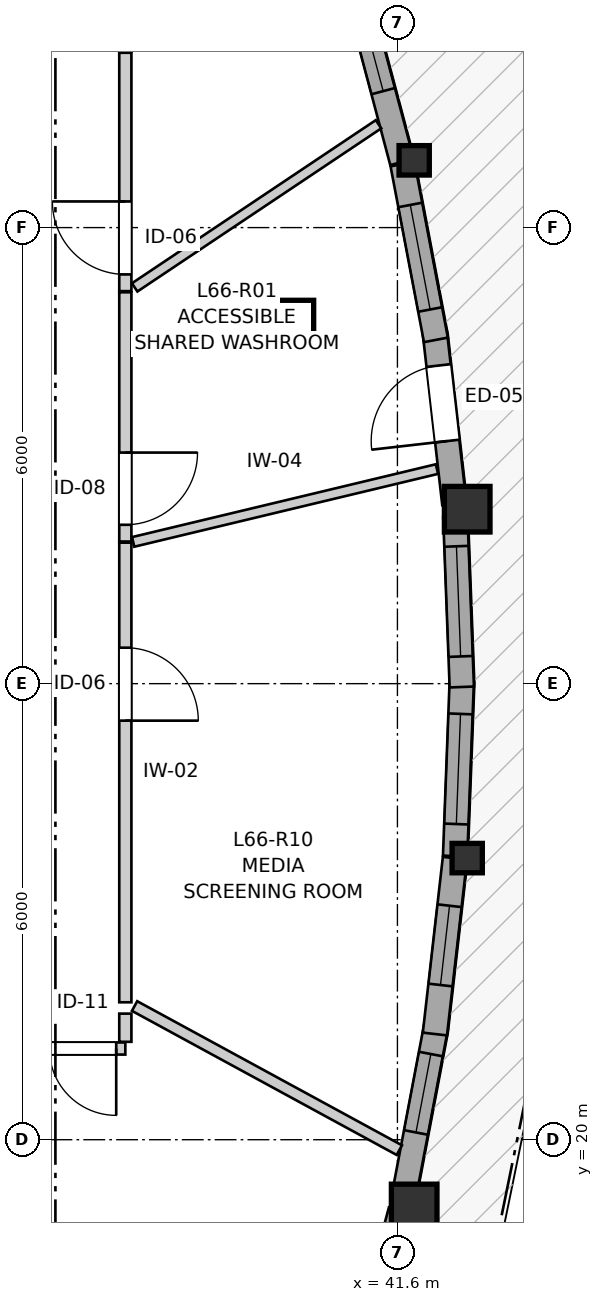
"""IFC4 building model, lengths in metres.
Left out: names, types, materials, properties, quantities, classifications, styles, units other than length and angle.
Written with IfcOpenShell. Run it as: python <this file> out.ifc"""

import sys

from ifc_helpers import new_model, si_unit, direction, frame, frame_2d, origin, origin_2d, place, context, subcontext, project, spatial, rectangle, i_section, extrude, source, transform, mapped, element, fill, save


model = new_model("IFC4")
c1 = context("Model", 3, precision=1e-05, world=origin(), true_north=direction((0.0, 1.0)))
c2 = subcontext(c1, "Body", "Model", "MODEL_VIEW")
j1 = project(units=[si_unit("LENGTHUNIT", "METRE"), si_unit("PLANEANGLEUNIT", "RADIAN")], contexts=[c1])
p1 = place(None, origin())
s1 = spatial("IfcSite", under=j1, at=p1, CompositionType="ELEMENT")
p2 = place(p1, origin())
s2 = spatial("IfcBuilding", under=s1, at=p2, CompositionType="ELEMENT")
p3 = place(p2, frame((0.0, 0.0, 221.2)))
s3 = spatial("IfcBuildingStorey", under=s2, at=p3, CompositionType="ELEMENT", Elevation=221.2)
m1 = source(origin(), c2, "Body", "SweptSolid", [
    extrude(rectangle(XDim=0.6, YDim=0.6, at=origin_2d()), origin(), (0.0, 0.0, 1.0), 2.96),
])
p4 = place(p3, frame((41.82, 19.115, 0.0), z_axis=(0.0, 0.0, 1.0), x_axis=(1.0, 0.0, 0.0)))
e1 = element("IfcColumn", 1, at=p4, inside=s3, PredefinedType="COLUMN", context=c2, shape_type="MappedRepresentation", body=[
    mapped(m1, transform((0.0, 0.0, 0.0), x_axis=(1.0, 0.0, 0.0), y_axis=(0.0, 1.0, 0.0), z_axis=(0.0, 0.0, 1.0), scale=1.0)),
])
m2 = source(origin(), c2, "Body", "SweptSolid", [
    extrude(i_section(OverallWidth=0.398, OverallDepth=0.387, WebThickness=0.019, FlangeThickness=0.03, FilletRadius=0.015, at=origin_2d()), origin(), (0.0, 0.0, 1.0), 2.96),
])
p5 = place(p3, frame((42.518, 23.705, 0.0), z_axis=(0.0, 0.0, 1.0), x_axis=(1.0, 0.0, 0.0)))
e2 = element("IfcColumn", 2, at=p5, inside=s3, PredefinedType="PILASTER", context=c2, shape_type="MappedRepresentation", body=[
    mapped(m2, transform((0.0, 0.0, 0.0), x_axis=(1.0, 0.0, 0.0), y_axis=(0.0, 1.0, 0.0), z_axis=(0.0, 0.0, 1.0), scale=1.0)),
])
p6 = place(p3, frame((42.518, 28.295, 0.0), z_axis=(0.0, 0.0, 1.0), x_axis=(1.0, 0.0, 0.0)))
e3 = element("IfcColumn", 3, at=p6, inside=s3, PredefinedType="COLUMN", context=c2, shape_type="MappedRepresentation", body=[
    mapped(m1, transform((0.0, 0.0, 0.0), x_axis=(1.0, 0.0, 0.0), y_axis=(0.0, 1.0, 0.0), z_axis=(0.0, 0.0, 1.0), scale=1.0)),
])
p7 = place(p3, frame((41.82, 32.885, 0.0), z_axis=(0.0, 0.0, 1.0), x_axis=(1.0, 0.0, 0.0)))
e4 = element("IfcColumn", 4, at=p7, inside=s3, PredefinedType="PILASTER", context=c2, shape_type="MappedRepresentation", body=[
    mapped(m2, transform((0.0, 0.0, 0.0), x_axis=(1.0, 0.0, 0.0), y_axis=(0.0, 1.0, 0.0), z_axis=(0.0, 0.0, 1.0), scale=1.0)),
])
p8 = place(p3, frame((41.045, 16.824, 0.0), z_axis=(0.0, 0.0, 1.0), x_axis=(0.257099982868, 0.966384808867, 0.0)))
e5 = element("IfcWall", 5, at=p8, inside=s3, PredefinedType="SOLIDWALL", context=c2, shape_type="SweptSolid", body=[
    extrude(rectangle(XDim=2.323, YDim=0.32, at=frame_2d((1.161, 0.0))), origin(), (0.0, 0.0, 1.0), 2.58),
])
p9 = place(p8, frame((0.491, 0.0, 0.82)))
e6 = element("IfcOpeningElement", 6, at=p9, cuts=e5, PredefinedType="OPENING", context=c2, shape_type="SweptSolid", body=[
    extrude(rectangle(XDim=1.35, YDim=1.45, at=frame_2d((0.675, 0.725))), frame((0.0, 0.17, 0.0), z_axis=(0.0, -1.0, 0.0), x_axis=(1.0, 0.0, 0.0)), (0.0, 0.0, 1.0), 0.34),
])
p10 = place(p3, frame((41.68, 19.233, 0.0), z_axis=(0.0, 0.0, 1.0), x_axis=(0.186630727552, 0.982430135701, 0.0)))
e7 = element("IfcWall", 7, at=p10, inside=s3, PredefinedType="SOLIDWALL", context=c2, shape_type="SweptSolid", body=[
    extrude(rectangle(XDim=2.284, YDim=0.32, at=frame_2d((1.142, 0.0))), origin(), (0.0, 0.0, 1.0), 2.58),
])
p11 = place(p10, frame((0.878, 0.0, 0.82)))
e8 = element("IfcOpeningElement", 8, at=p11, cuts=e7, PredefinedType="OPENING", context=c2, shape_type="SweptSolid", body=[
    extrude(rectangle(XDim=1.05, YDim=1.45, at=frame_2d((0.525, 0.725))), frame((0.0, 0.17, 0.0), z_axis=(0.0, -1.0, 0.0), x_axis=(1.0, 0.0, 0.0)), (0.0, 0.0, 1.0), 0.34),
])
p12 = place(p3, frame((42.093, 21.39, 0.0), z_axis=(0.0, 0.0, 1.0), x_axis=(0.113262644001, 0.993565082656, 0.0)))
e9 = element("IfcWall", 9, at=p12, inside=s3, PredefinedType="SOLIDWALL", context=c2, shape_type="SweptSolid", body=[
    extrude(rectangle(XDim=2.328, YDim=0.32, at=frame_2d((1.164, 0.0))), origin(), (0.0, 0.0, 1.0), 2.58),
])
p13 = place(p12, frame((0.649, 0.0, 0.82)))
e10 = element("IfcOpeningElement", 10, at=p13, cuts=e9, PredefinedType="OPENING", context=c2, shape_type="SweptSolid", body=[
    extrude(rectangle(XDim=1.05, YDim=1.45, at=frame_2d((0.525, 0.725))), frame((0.0, 0.17, 0.0), z_axis=(0.0, -1.0, 0.0), x_axis=(1.0, 0.0, 0.0)), (0.0, 0.0, 1.0), 0.34),
])
p14 = place(p3, frame((42.359, 23.731, 0.0), z_axis=(0.0, 0.0, 1.0), x_axis=(0.037975332386, 0.999278676912, 0.0)))
e11 = element("IfcWall", 11, at=p14, inside=s3, PredefinedType="SOLIDWALL", context=c2, shape_type="SweptSolid", body=[
    extrude(rectangle(XDim=2.314, YDim=0.32, at=frame_2d((1.157, 0.0))), origin(), (0.0, 0.0, 1.0), 2.58),
])
p15 = place(p14, frame((0.422, 0.0, 0.82)))
e12 = element("IfcOpeningElement", 12, at=p15, cuts=e11, PredefinedType="OPENING", context=c2, shape_type="SweptSolid", body=[
    extrude(rectangle(XDim=1.45, YDim=1.25, at=frame_2d((0.725, 0.625))), frame((0.0, 0.17, 0.0), z_axis=(0.0, -1.0, 0.0), x_axis=(1.0, 0.0, 0.0)), (0.0, 0.0, 1.0), 0.34),
])
p16 = place(p3, frame((42.447, 25.956, 0.0), z_axis=(0.0, 0.0, 1.0), x_axis=(-0.037961080573, 0.999279218418, 0.0)))
e13 = element("IfcWall", 13, at=p16, inside=s3, PredefinedType="SOLIDWALL", context=c2, shape_type="SweptSolid", body=[
    extrude(rectangle(XDim=2.245, YDim=0.32, at=frame_2d((1.122, 0.0))), origin(), (0.0, 0.0, 1.0), 2.58),
])
p17 = place(p16, frame((0.402, 0.0, 0.82)))
e14 = element("IfcOpeningElement", 14, at=p17, cuts=e13, PredefinedType="OPENING", context=c2, shape_type="SweptSolid", body=[
    extrude(rectangle(XDim=1.45, YDim=1.25, at=frame_2d((0.725, 0.625))), frame((0.0, 0.17, 0.0), z_axis=(0.0, -1.0, 0.0), x_axis=(1.0, 0.0, 0.0)), (0.0, 0.0, 1.0), 0.34),
])
p18 = place(p3, frame((42.349, 28.366, 0.0), z_axis=(0.0, 0.0, 1.0), x_axis=(-0.113314829757, 0.99355913229, 0.0)))
e15 = element("IfcWall", 15, at=p18, inside=s3, PredefinedType="SOLIDWALL", context=c2, shape_type="SweptSolid", body=[
    extrude(rectangle(XDim=2.258, YDim=0.32, at=frame_2d((1.129, 0.0))), origin(), (0.0, 0.0, 1.0), 2.58),
])
p19 = place(p18, frame((0.83, 0.0, 0.0)))
e16 = element("IfcOpeningElement", 16, at=p19, cuts=e15, PredefinedType="OPENING", context=c2, shape_type="SweptSolid", body=[
    extrude(rectangle(XDim=1.0, YDim=2.1, at=frame_2d((0.5, 1.05))), frame((0.0, 0.17, 0.0), z_axis=(0.0, -1.0, 0.0), x_axis=(1.0, 0.0, 0.0)), (0.0, 0.0, 1.0), 0.34),
])
p20 = place(p3, frame((42.106, 30.523, 0.0), z_axis=(0.0, 0.0, 1.0), x_axis=(-0.186673658051, 0.982421979289, 0.0)))
e17 = element("IfcWall", 17, at=p20, inside=s3, PredefinedType="SOLIDWALL", context=c2, shape_type="SweptSolid", body=[
    extrude(rectangle(XDim=2.354, YDim=0.32, at=frame_2d((1.177, 0.0))), origin(), (0.0, 0.0, 1.0), 2.58),
])
p21 = place(p20, frame((0.407, 0.0, 0.82)))
e18 = element("IfcOpeningElement", 18, at=p21, cuts=e17, PredefinedType="OPENING", context=c2, shape_type="SweptSolid", body=[
    extrude(rectangle(XDim=1.4, YDim=1.35, at=frame_2d((0.7, 0.675))), frame((0.0, 0.17, 0.0), z_axis=(0.0, -1.0, 0.0), x_axis=(1.0, 0.0, 0.0)), (0.0, 0.0, 1.0), 0.34),
])
p22 = place(p3, frame((41.66, 32.863, 0.0), z_axis=(0.0, 0.0, 1.0), x_axis=(-0.257008511659, 0.966409139513, 0.0)))
e19 = element("IfcWall", 19, at=p22, inside=s3, PredefinedType="SOLIDWALL", context=c2, shape_type="SweptSolid", body=[
    extrude(rectangle(XDim=2.393, YDim=0.32, at=frame_2d((1.196, 0.0))), origin(), (0.0, 0.0, 1.0), 2.58),
])
p23 = place(p22, frame((0.965, 0.0, 0.82)))
e20 = element("IfcOpeningElement", 20, at=p23, cuts=e19, PredefinedType="OPENING", context=c2, shape_type="SweptSolid", body=[
    extrude(rectangle(XDim=0.95, YDim=1.35, at=frame_2d((0.475, 0.675))), frame((0.0, 0.17, 0.0), z_axis=(0.0, -1.0, 0.0), x_axis=(1.0, 0.0, 0.0)), (0.0, 0.0, 1.0), 0.34),
])
p24 = place(p3, frame((38.02, 27.855, 0.0), z_axis=(0.0, 0.0, 1.0), x_axis=(0.0, -1.0, 0.0)))
e21 = element("IfcWall", 21, at=p24, inside=s3, PredefinedType="PARTITIONING", context=c2, shape_type="SweptSolid", body=[
    extrude(rectangle(XDim=6.047, YDim=0.16, at=frame_2d((3.023, 0.0))), origin(), (0.0, 0.0, 1.0), 2.96),
])
p25 = place(p24, frame((1.382, 0.0, 0.0)))
e22 = element("IfcOpeningElement", 22, at=p25, cuts=e21, PredefinedType="OPENING", context=c2, shape_type="SweptSolid", body=[
    extrude(rectangle(XDim=0.96, YDim=2.1, at=frame_2d((0.48, 1.05))), frame((0.0, 0.09, 0.0), z_axis=(0.0, -1.0, 0.0), x_axis=(1.0, 0.0, 0.0)), (0.0, 0.0, 1.0), 0.18),
])
p26 = place(p3, frame((38.02, 31.149, 0.0), z_axis=(0.0, 0.0, 1.0), x_axis=(0.0, -1.0, 0.0)))
e23 = element("IfcWall", 23, at=p26, inside=s3, PredefinedType="PARTITIONING", context=c2, shape_type="SweptSolid", body=[
    extrude(rectangle(XDim=3.279, YDim=0.16, at=frame_2d((1.639, 0.0))), origin(), (0.0, 0.0, 1.0), 2.628),
])
p27 = place(p26, frame((2.109, 0.0, 0.0)))
e24 = element("IfcOpeningElement", 24, at=p27, cuts=e23, PredefinedType="OPENING", context=c2, shape_type="SweptSolid", body=[
    extrude(rectangle(XDim=0.95, YDim=2.1, at=frame_2d((0.475, 1.05))), frame((0.0, 0.09, 0.0), z_axis=(0.0, -1.0, 0.0), x_axis=(1.0, 0.0, 0.0)), (0.0, 0.0, 1.0), 0.18),
])
p28 = place(p3, frame((38.02, 31.164, 0.0), z_axis=(0.0, 0.0, 1.0), x_axis=(0.0, 1.0, 0.0)))
e25 = element("IfcWall", 25, at=p28, inside=s3, PredefinedType="PARTITIONING", context=c2, shape_type="SweptSolid", body=[
    extrude(rectangle(XDim=3.136, YDim=0.16, at=frame_2d((1.568, 0.0))), origin(), (0.0, 0.0, 1.0), 2.628),
])
p29 = place(p28, frame((0.22, 0.0, 0.0)))
e26 = element("IfcOpeningElement", 26, at=p29, cuts=e25, PredefinedType="OPENING", context=c2, shape_type="SweptSolid", body=[
    extrude(rectangle(XDim=0.96, YDim=2.1, at=frame_2d((0.48, 1.05))), frame((0.0, 0.09, 0.0), z_axis=(0.0, -1.0, 0.0), x_axis=(1.0, 0.0, 0.0)), (0.0, 0.0, 1.0), 0.18),
])
p30 = place(p3, frame((38.02, 21.2, 0.0), z_axis=(0.0, 0.0, 1.0), x_axis=(-1.0, 0.0, 0.0)))
e27 = element("IfcWall", 27, at=p30, inside=s3, PredefinedType="PARTITIONING", context=c2, shape_type="SweptSolid", body=[
    extrude(rectangle(XDim=1.612, YDim=0.16, at=frame_2d((0.806, 0.0))), origin(), (0.0, 0.0, 1.0), 2.96),
])
p31 = place(p30, frame((0.12, 0.0, 0.0)))
e28 = element("IfcOpeningElement", 28, at=p31, cuts=e27, PredefinedType="OPENING", context=c2, shape_type="SweptSolid", body=[
    extrude(rectangle(XDim=0.88, YDim=2.0, at=frame_2d((0.44, 1.0))), frame((0.0, 0.09, 0.0), z_axis=(0.0, -1.0, 0.0), x_axis=(1.0, 0.0, 0.0)), (0.0, 0.0, 1.0), 0.18),
])
p32 = place(p3, frame((38.123, 27.865, 0.0), z_axis=(0.0, 0.0, 1.0), x_axis=(0.972444961782, 0.233132572379, 0.0)))
e29 = element("IfcWall", 29, at=p32, inside=s3, PredefinedType="PARTITIONING", context=c2, shape_type="SweptSolid", body=[
    extrude(rectangle(XDim=4.11, YDim=0.13, at=frame_2d((2.055, 0.0))), origin(), (0.0, 0.0, 1.0), 2.96),
])
p33 = place(p3, frame((38.142, 21.759, 0.0), z_axis=(0.0, 0.0, 1.0), x_axis=(0.878323390095, -0.478066964359, 0.0)))
e30 = element("IfcWall", 30, at=p33, inside=s3, PredefinedType="PARTITIONING", context=c2, shape_type="SweptSolid", body=[
    extrude(rectangle(XDim=3.966, YDim=0.145, at=frame_2d((1.983, 0.0))), origin(), (0.0, 0.0, 1.0), 1.728),
])
p34 = place(p3, frame((38.143, 31.213, 0.0), z_axis=(0.0, 0.0, 1.0), x_axis=(0.831154063558, 0.556042195009, 0.0)))
e31 = element("IfcWall", 31, at=p34, inside=s3, PredefinedType="PARTITIONING", context=c2, shape_type="SweptSolid", body=[
    extrude(rectangle(XDim=3.86, YDim=0.13, at=frame_2d((1.93, 0.0))), origin(), (0.0, 0.0, 1.0), 2.96),
])
p35 = place(p3, frame((38.02, 21.288, 0.0), z_axis=(0.0, 0.0, 1.0), x_axis=(0.0, 1.0, 0.0)))
e32 = element("IfcWall", 32, at=p35, inside=s3, PredefinedType="PARTITIONING", context=c2, shape_type="SweptSolid", body=[
    extrude(rectangle(XDim=0.371, YDim=0.16, at=frame_2d((0.186, 0.0))), origin(), (0.0, 0.0, 1.0), 2.96),
])
m3 = source(origin(), c2, "Body", "SweptSolid", [
    extrude(rectangle(XDim=1.05, YDim=1.45, at=frame_2d((0.525, 0.725))), frame((0.0, 0.03, 0.0), z_axis=(0.0, -1.0, 0.0), x_axis=(1.0, 0.0, 0.0)), (0.0, 0.0, 1.0), 0.06),
])
p36 = place(p11, origin())
e33 = element("IfcWindow", 33, at=p36, inside=s3, PartitioningType="SINGLE_PANEL", PredefinedType="WINDOW", context=c2, shape_type="MappedRepresentation", body=[
    mapped(m3, transform((0.0, 0.0, 0.0), x_axis=(1.0, 0.0, 0.0), y_axis=(0.0, 1.0, 0.0), z_axis=(0.0, 0.0, 1.0), scale=1.0)),
])
fill(e8, e33)
p37 = place(p13, origin())
e34 = element("IfcWindow", 34, at=p37, inside=s3, PartitioningType="SINGLE_PANEL", PredefinedType="WINDOW", context=c2, shape_type="MappedRepresentation", body=[
    mapped(m3, transform((0.0, 0.0, 0.0), x_axis=(1.0, 0.0, 0.0), y_axis=(0.0, 1.0, 0.0), z_axis=(0.0, 0.0, 1.0), scale=1.0)),
])
fill(e10, e34)
m4 = source(origin(), c2, "Body", "SweptSolid", [
    extrude(rectangle(XDim=1.45, YDim=1.25, at=frame_2d((0.725, 0.625))), frame((0.0, 0.03, 0.0), z_axis=(0.0, -1.0, 0.0), x_axis=(1.0, 0.0, 0.0)), (0.0, 0.0, 1.0), 0.06),
])
p38 = place(p15, origin())
e35 = element("IfcWindow", 35, at=p38, inside=s3, PartitioningType="SINGLE_PANEL", PredefinedType="WINDOW", context=c2, shape_type="MappedRepresentation", body=[
    mapped(m4, transform((0.0, 0.0, 0.0), x_axis=(1.0, 0.0, 0.0), y_axis=(0.0, 1.0, 0.0), z_axis=(0.0, 0.0, 1.0), scale=1.0)),
])
fill(e12, e35)
p39 = place(p17, origin())
e36 = element("IfcWindow", 36, at=p39, inside=s3, PartitioningType="SINGLE_PANEL", PredefinedType="WINDOW", context=c2, shape_type="MappedRepresentation", body=[
    mapped(m4, transform((0.0, 0.0, 0.0), x_axis=(1.0, 0.0, 0.0), y_axis=(0.0, 1.0, 0.0), z_axis=(0.0, 0.0, 1.0), scale=1.0)),
])
fill(e14, e36)
m5 = source(origin(), c2, "Body", "SweptSolid", [
    extrude(rectangle(XDim=1.0, YDim=2.1, at=frame_2d((0.5, 1.05))), frame((0.0, 0.025, 0.0), z_axis=(0.0, -1.0, 0.0), x_axis=(1.0, 0.0, 0.0)), (0.0, 0.0, 1.0), 0.05),
])
p40 = place(p19, origin())
e37 = element("IfcDoor", 37, at=p40, inside=s3, OperationType="SINGLE_SWING_LEFT", PredefinedType="DOOR", context=c2, shape_type="MappedRepresentation", body=[
    mapped(m5, transform((0.0, 0.0, 0.0), x_axis=(1.0, 0.0, 0.0), y_axis=(0.0, 1.0, 0.0), z_axis=(0.0, 0.0, 1.0), scale=1.0)),
])
fill(e16, e37)
m6 = source(origin(), c2, "Body", "SweptSolid", [
    extrude(rectangle(XDim=1.4, YDim=1.35, at=frame_2d((0.7, 0.675))), frame((0.0, 0.03, 0.0), z_axis=(0.0, -1.0, 0.0), x_axis=(1.0, 0.0, 0.0)), (0.0, 0.0, 1.0), 0.06),
])
p41 = place(p21, origin())
e38 = element("IfcWindow", 38, at=p41, inside=s3, PartitioningType="SINGLE_PANEL", PredefinedType="WINDOW", context=c2, shape_type="MappedRepresentation", body=[
    mapped(m6, transform((0.0, 0.0, 0.0), x_axis=(1.0, 0.0, 0.0), y_axis=(0.0, 1.0, 0.0), z_axis=(0.0, 0.0, 1.0), scale=1.0)),
])
fill(e18, e38)
m7 = source(origin(), c2, "Body", "SweptSolid", [
    extrude(rectangle(XDim=0.95, YDim=1.35, at=frame_2d((0.475, 0.675))), frame((0.0, 0.03, 0.0), z_axis=(0.0, -1.0, 0.0), x_axis=(1.0, 0.0, 0.0)), (0.0, 0.0, 1.0), 0.06),
])
p42 = place(p23, origin())
e39 = element("IfcWindow", 39, at=p42, inside=s3, PartitioningType="SINGLE_PANEL", PredefinedType="WINDOW", context=c2, shape_type="MappedRepresentation", body=[
    mapped(m7, transform((0.0, 0.0, 0.0), x_axis=(1.0, 0.0, 0.0), y_axis=(0.0, 1.0, 0.0), z_axis=(0.0, 0.0, 1.0), scale=1.0)),
])
fill(e20, e39)
m8 = source(origin(), c2, "Body", "SweptSolid", [
    extrude(rectangle(XDim=0.96, YDim=2.1, at=frame_2d((0.48, 1.05))), frame((0.0, 0.025, 0.0), z_axis=(0.0, -1.0, 0.0), x_axis=(1.0, 0.0, 0.0)), (0.0, 0.0, 1.0), 0.05),
])
p43 = place(p25, origin())
e40 = element("IfcDoor", 40, at=p43, inside=s3, OperationType="SINGLE_SWING_RIGHT", PredefinedType="DOOR", context=c2, shape_type="MappedRepresentation", body=[
    mapped(m8, transform((0.0, 0.0, 0.0), x_axis=(1.0, 0.0, 0.0), y_axis=(0.0, 1.0, 0.0), z_axis=(0.0, 0.0, 1.0), scale=1.0)),
])
fill(e22, e40)
m9 = source(origin(), c2, "Body", "SweptSolid", [
    extrude(rectangle(XDim=0.95, YDim=2.1, at=frame_2d((0.475, 1.05))), frame((0.0, 0.025, 0.0), z_axis=(0.0, -1.0, 0.0), x_axis=(1.0, 0.0, 0.0)), (0.0, 0.0, 1.0), 0.05),
])
p44 = place(p27, origin())
e41 = element("IfcDoor", 41, at=p44, inside=s3, OperationType="SINGLE_SWING_LEFT", PredefinedType="DOOR", context=c2, shape_type="MappedRepresentation", body=[
    mapped(m9, transform((0.0, 0.0, 0.0), x_axis=(1.0, 0.0, 0.0), y_axis=(0.0, 1.0, 0.0), z_axis=(0.0, 0.0, 1.0), scale=1.0)),
])
fill(e24, e41)
p45 = place(p29, origin())
e42 = element("IfcDoor", 42, at=p45, inside=s3, OperationType="SINGLE_SWING_RIGHT", PredefinedType="DOOR", context=c2, shape_type="MappedRepresentation", body=[
    mapped(m8, transform((0.0, 0.0, 0.0), x_axis=(1.0, 0.0, 0.0), y_axis=(0.0, 1.0, 0.0), z_axis=(0.0, 0.0, 1.0), scale=1.0)),
])
fill(e26, e42)
m10 = source(origin(), c2, "Body", "SweptSolid", [
    extrude(rectangle(XDim=0.88, YDim=2.0, at=frame_2d((0.44, 1.0))), frame((0.0, 0.025, 0.0), z_axis=(0.0, -1.0, 0.0), x_axis=(1.0, 0.0, 0.0)), (0.0, 0.0, 1.0), 0.05),
])
p46 = place(p31, origin())
e43 = element("IfcDoor", 43, at=p46, inside=s3, OperationType="SINGLE_SWING_LEFT", PredefinedType="DOOR", context=c2, shape_type="MappedRepresentation", body=[
    mapped(m10, transform((0.0, 0.0, 0.0), x_axis=(1.0, 0.0, 0.0), y_axis=(0.0, 1.0, 0.0), z_axis=(0.0, 0.0, 1.0), scale=1.0)),
])
fill(e28, e43)
save(model, sys.argv[1])
